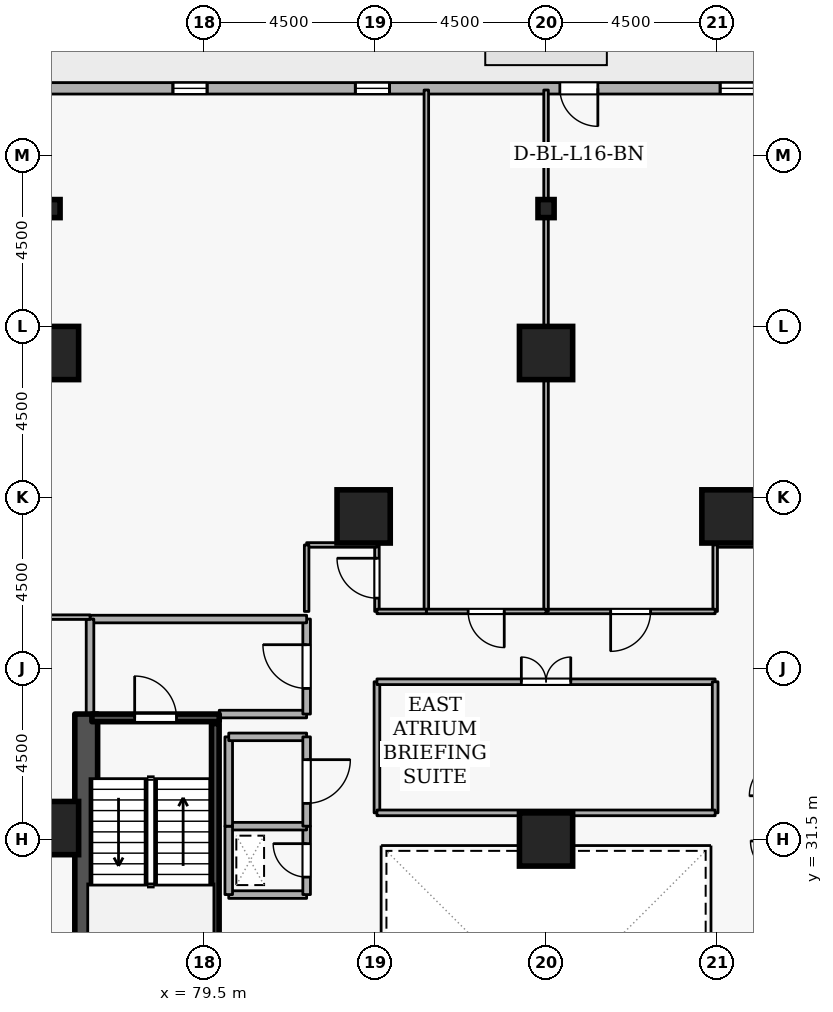
"""IFC4 building model, lengths in metres.
Left out: names, types, materials, properties, quantities, classifications, styles, units other than length and angle.
Written with IfcOpenShell. Run it as: python <this file> out.ifc"""

import sys

from ifc_helpers import new_model, si_unit, direction, frame, frame_2d, origin, origin_2d, place, context, subcontext, project, spatial, rectangle, i_section, extrude, element, fill, save


model = new_model("IFC4")
c1 = context("Model", 3, precision=1e-05, world=origin(), true_north=direction((0.0, 1.0)))
c2 = subcontext(c1, "Body", "Model", "MODEL_VIEW")
j1 = project(units=[si_unit("LENGTHUNIT", "METRE"), si_unit("PLANEANGLEUNIT", "RADIAN")], contexts=[c1])
p1 = place(None, origin())
s1 = spatial("IfcSite", under=j1, at=p1, CompositionType="ELEMENT")
p2 = place(p1, origin())
s2 = spatial("IfcBuilding", under=s1, at=p2, CompositionType="ELEMENT")
p3 = place(p2, frame((0.0, 0.0, 64.5)))
s3 = spatial("IfcBuildingStorey", under=s2, at=p3, CompositionType="ELEMENT", Elevation=64.5)
p4 = place(p3, frame((76.4, 19.2, 0.0), z_axis=(0.0, 0.0, 1.0), x_axis=(0.0, 1.0, 0.0)))
e1 = element("IfcWall", 1, at=p4, inside=s3, PredefinedType="SHEAR", context=c2, shape_type="SweptSolid", body=[
    extrude(rectangle(XDim=15.6, YDim=0.6, at=frame_2d((7.8, 0.0))), origin(), (0.0, 0.0, 1.0), 3.6),
])
for number, where, z_axis, x_axis in (
    (2, (88.5, 44.3, 0.0), (0.0, 0.0, 1.0), (1.0, 0.0, 0.0)),
    (3, (75.5, 44.3, 0.0), (0.0, 0.0, 1.0), (1.0, 0.0, 0.0)),
    (4, (93.3, 40.0, 0.0), (0.0, 0.0, 1.0), (1.0, 0.0, 0.0)),
    (5, (83.7, 40.0, 0.0), (0.0, 0.0, 1.0), (1.0, 0.0, 0.0)),
    (6, (75.5, 31.8, 0.0), (0.0, 0.0, 1.0), (1.0, 0.0, 0.0)),
    (7, (88.5, 31.5, 0.0), (0.0, 0.0, 1.0), (1.0, 0.0, 0.0)),
):
    element("IfcColumn", number, at=place(p3, frame(where, z_axis=z_axis, x_axis=x_axis)), inside=s3, PredefinedType="COLUMN", context=c2, shape_type="SweptSolid", body=[
        extrude(rectangle(XDim=1.4, YDim=1.4, at=origin_2d()), origin(), (0.0, 0.0, 1.0), 3.6),
    ])
for number, where, z_axis, x_axis in (
    (8, (88.5, 48.1, 0.0), (0.0, 0.0, 1.0), (1.0, 0.0, 0.0)),
    (9, (75.5, 48.1, 0.0), (0.0, 0.0, 1.0), (1.0, 0.0, 0.0)),
):
    element("IfcColumn", number, at=place(p3, frame(where, z_axis=z_axis, x_axis=x_axis)), inside=s3, PredefinedType="COLUMN", context=c2, shape_type="SweptSolid", body=[
        extrude(i_section(OverallWidth=0.424, OverallDepth=0.475, WebThickness=0.048, FlangeThickness=0.077, FilletRadius=0.015, at=origin_2d()), origin(), (0.0, 0.0, 1.0), 3.6),
    ])
p5 = place(p3, frame((110.181, 51.265, 0.0), z_axis=(0.0, 0.0, 1.0), x_axis=(-0.999999999457, -3.2959355e-05, 0.0)))
e10 = element("IfcWall", 10, at=p5, inside=s3, PredefinedType="STANDARD", context=c2, shape_type="SweptSolid", body=[
    extrude(rectangle(XDim=37.037, YDim=0.3, at=frame_2d((18.518, 0.0))), origin(), (0.0, 0.0, 1.0), 2.7),
])
p6 = place(p5, frame((20.318, 0.0, 0.0)))
e11 = element("IfcOpeningElement", 11, at=p6, cuts=e10, PredefinedType="OPENING", context=c2, shape_type="SweptSolid", body=[
    extrude(rectangle(XDim=1.0, YDim=2.08, at=frame_2d((0.5, 1.04))), frame((0.0, 0.16, 0.0), z_axis=(0.0, -1.0, 0.0), x_axis=(1.0, 0.0, 0.0)), (0.0, 0.0, 1.0), 0.32),
])
p7 = place(p5, frame((1.8, 0.0, 0.72)))
e12 = element("IfcOpeningElement", 12, at=p7, cuts=e10, PredefinedType="OPENING", context=c2, shape_type="SweptSolid", body=[
    extrude(rectangle(XDim=0.9, YDim=1.75, at=frame_2d((0.45, 0.875))), frame((0.0, 0.16, 0.0), z_axis=(0.0, -1.0, 0.0), x_axis=(1.0, 0.0, 0.0)), (0.0, 0.0, 1.0), 0.32),
])
p8 = place(p5, frame((6.6, 0.0, 0.72)))
e13 = element("IfcOpeningElement", 13, at=p8, cuts=e10, PredefinedType="OPENING", context=c2, shape_type="SweptSolid", body=[
    extrude(rectangle(XDim=0.9, YDim=1.75, at=frame_2d((0.45, 0.875))), frame((0.0, 0.16, 0.0), z_axis=(0.0, -1.0, 0.0), x_axis=(1.0, 0.0, 0.0)), (0.0, 0.0, 1.0), 0.32),
])
p9 = place(p5, frame((11.4, 0.0, 0.72)))
e14 = element("IfcOpeningElement", 14, at=p9, cuts=e10, PredefinedType="OPENING", context=c2, shape_type="SweptSolid", body=[
    extrude(rectangle(XDim=0.9, YDim=1.75, at=frame_2d((0.45, 0.875))), frame((0.0, 0.16, 0.0), z_axis=(0.0, -1.0, 0.0), x_axis=(1.0, 0.0, 0.0)), (0.0, 0.0, 1.0), 0.32),
])
p10 = place(p5, frame((16.2, 0.0, 0.72)))
e15 = element("IfcOpeningElement", 15, at=p10, cuts=e10, PredefinedType="OPENING", context=c2, shape_type="SweptSolid", body=[
    extrude(rectangle(XDim=0.9, YDim=1.75, at=frame_2d((0.45, 0.875))), frame((0.0, 0.16, 0.0), z_axis=(0.0, -1.0, 0.0), x_axis=(1.0, 0.0, 0.0)), (0.0, 0.0, 1.0), 0.32),
])
p11 = place(p5, frame((25.8, 0.0, 0.72)))
e16 = element("IfcOpeningElement", 16, at=p11, cuts=e10, PredefinedType="OPENING", context=c2, shape_type="SweptSolid", body=[
    extrude(rectangle(XDim=0.9, YDim=1.75, at=frame_2d((0.45, 0.875))), frame((0.0, 0.16, 0.0), z_axis=(0.0, -1.0, 0.0), x_axis=(1.0, 0.0, 0.0)), (0.0, 0.0, 1.0), 0.32),
])
p12 = place(p5, frame((30.6, 0.0, 0.72)))
e17 = element("IfcOpeningElement", 17, at=p12, cuts=e10, PredefinedType="OPENING", context=c2, shape_type="SweptSolid", body=[
    extrude(rectangle(XDim=0.9, YDim=1.75, at=frame_2d((0.45, 0.875))), frame((0.0, 0.16, 0.0), z_axis=(0.0, -1.0, 0.0), x_axis=(1.0, 0.0, 0.0)), (0.0, 0.0, 1.0), 0.32),
])
p13 = place(p3, frame((76.55, 34.7, 0.0), z_axis=(0.0, 0.0, 1.0), x_axis=(1.0, 0.0, 0.0)))
e18 = element("IfcWall", 18, at=p13, inside=s3, PredefinedType="SHEAR", context=c2, shape_type="SweptSolid", body=[
    extrude(rectangle(XDim=3.35, YDim=0.2, at=frame_2d((1.675, 0.0))), origin(), (0.0, 0.0, 1.0), 3.6),
])
p14 = place(p13, frame((1.125, 0.0, 0.0)))
e19 = element("IfcOpeningElement", 19, at=p14, cuts=e18, PredefinedType="OPENING", context=c2, shape_type="SweptSolid", body=[
    extrude(rectangle(XDim=1.1, YDim=2.1, at=frame_2d((0.55, 1.05))), frame((0.0, 0.11, 0.0), z_axis=(0.0, -1.0, 0.0), x_axis=(1.0, 0.0, 0.0)), (0.0, 0.0, 1.0), 0.22),
])
p15 = place(p3, frame((79.797, 27.45, 0.0), z_axis=(0.0, 0.0, 1.0), x_axis=(0.0, 1.0, 0.0)))
e20 = element("IfcWall", 20, at=p15, inside=s3, PredefinedType="SHEAR", context=c2, shape_type="SweptSolid", body=[
    extrude(rectangle(XDim=7.1, YDim=0.2, at=frame_2d((3.55, 0.0))), origin(), (0.0, 0.0, 1.0), 3.6),
])
p16 = place(p3, frame((79.9, 34.8, 0.0), z_axis=(0.0, 0.0, 1.0), x_axis=(1.0, 0.0, 0.0)))
e21 = element("IfcWall", 21, at=p16, inside=s3, PredefinedType="STANDARD", context=c2, shape_type="SweptSolid", body=[
    extrude(rectangle(XDim=2.3, YDim=0.2, at=frame_2d((1.15, 0.0))), origin(), (0.0, 0.0, 1.0), 2.545),
])
p17 = place(p3, frame((82.2, 34.8, 0.0), z_axis=(0.0, 0.0, 1.0), x_axis=(0.0, 1.0, 0.0)))
e22 = element("IfcWall", 22, at=p17, inside=s3, PredefinedType="STANDARD", context=c2, shape_type="SweptSolid", body=[
    extrude(rectangle(XDim=2.5, YDim=0.2, at=frame_2d((1.25, 0.0))), origin(), (0.0, 0.0, 1.0), 3.34),
])
p18 = place(p17, frame((0.675, 0.0, 0.0)))
e23 = element("IfcOpeningElement", 23, at=p18, cuts=e22, PredefinedType="OPENING", context=c2, shape_type="SweptSolid", body=[
    extrude(rectangle(XDim=1.15, YDim=2.1, at=frame_2d((0.575, 1.05))), frame((0.0, 0.11, 0.0), z_axis=(0.0, -1.0, 0.0), x_axis=(1.0, 0.0, 0.0)), (0.0, 0.0, 1.0), 0.22),
])
p19 = place(p3, frame((82.2, 37.3, 0.0), z_axis=(0.0, 0.0, 1.0), x_axis=(-1.0, 0.0, 0.0)))
e24 = element("IfcWall", 24, at=p19, inside=s3, PredefinedType="STANDARD", context=c2, shape_type="SweptSolid", body=[
    extrude(rectangle(XDim=5.7, YDim=0.2, at=frame_2d((2.85, 0.0))), origin(), (0.0, 0.0, 1.0), 3.34),
])
p20 = place(p3, frame((76.5, 37.3, 0.0), z_axis=(0.0, 0.0, 1.0), x_axis=(0.0, -1.0, 0.0)))
e25 = element("IfcWall", 25, at=p20, inside=s3, PredefinedType="STANDARD", context=c2, shape_type="SweptSolid", body=[
    extrude(rectangle(XDim=2.5, YDim=0.2, at=frame_2d((1.25, 0.0))), origin(), (0.0, 0.0, 1.0), 3.34),
])
p21 = place(p3, frame((80.15, 30.05, 0.0), z_axis=(0.0, 0.0, 1.0), x_axis=(1.0, 0.0, 0.0)))
e26 = element("IfcWall", 26, at=p21, inside=s3, PredefinedType="STANDARD", context=c2, shape_type="SweptSolid", body=[
    extrude(rectangle(XDim=2.05, YDim=0.2, at=frame_2d((1.025, 0.0))), origin(), (0.0, 0.0, 1.0), 3.34),
])
p22 = place(p3, frame((82.2, 30.05, 0.0), z_axis=(0.0, 0.0, 1.0), x_axis=(0.0, 1.0, 0.0)))
e27 = element("IfcWall", 27, at=p22, inside=s3, PredefinedType="STANDARD", context=c2, shape_type="SweptSolid", body=[
    extrude(rectangle(XDim=1.8, YDim=0.2, at=frame_2d((0.9, 0.0))), origin(), (0.0, 0.0, 1.0), 3.34),
])
p23 = place(p22, frame((0.46, 0.0, 0.0)))
e28 = element("IfcOpeningElement", 28, at=p23, cuts=e27, PredefinedType="OPENING", context=c2, shape_type="SweptSolid", body=[
    extrude(rectangle(XDim=0.88, YDim=2.04, at=frame_2d((0.44, 1.02))), frame((0.0, 0.11, 0.0), z_axis=(0.0, -1.0, 0.0), x_axis=(1.0, 0.0, 0.0)), (0.0, 0.0, 1.0), 0.22),
])
p24 = place(p3, frame((82.2, 31.85, 0.0), z_axis=(0.0, 0.0, 1.0), x_axis=(-1.0, 0.0, 0.0)))
e29 = element("IfcWall", 29, at=p24, inside=s3, PredefinedType="STANDARD", context=c2, shape_type="SweptSolid", body=[
    extrude(rectangle(XDim=2.05, YDim=0.2, at=frame_2d((1.025, 0.0))), origin(), (0.0, 0.0, 1.0), 3.34),
])
p25 = place(p3, frame((80.15, 31.85, 0.0), z_axis=(0.0, 0.0, 1.0), x_axis=(0.0, -1.0, 0.0)))
e30 = element("IfcWall", 30, at=p25, inside=s3, PredefinedType="STANDARD", context=c2, shape_type="SweptSolid", body=[
    extrude(rectangle(XDim=1.8, YDim=0.2, at=frame_2d((0.9, 0.0))), origin(), (0.0, 0.0, 1.0), 3.34),
])
p26 = place(p3, frame((80.15, 31.85, 0.0), z_axis=(0.0, 0.0, 1.0), x_axis=(0.0, 1.0, 0.0)))
e31 = element("IfcWall", 31, at=p26, inside=s3, PredefinedType="STANDARD", context=c2, shape_type="SweptSolid", body=[
    extrude(rectangle(XDim=2.35, YDim=0.2, at=frame_2d((1.175, 0.0))), origin(), (0.0, 0.0, 1.0), 3.34),
])
p27 = place(p3, frame((80.15, 34.2, 0.0), z_axis=(0.0, 0.0, 1.0), x_axis=(1.0, 0.0, 0.0)))
e32 = element("IfcWall", 32, at=p27, inside=s3, PredefinedType="STANDARD", context=c2, shape_type="SweptSolid", body=[
    extrude(rectangle(XDim=2.05, YDim=0.2, at=frame_2d((1.025, 0.0))), origin(), (0.0, 0.0, 1.0), 2.545),
])
p28 = place(p3, frame((82.2, 34.2, 0.0), z_axis=(0.0, 0.0, 1.0), x_axis=(0.0, -1.0, 0.0)))
e33 = element("IfcWall", 33, at=p28, inside=s3, PredefinedType="STANDARD", context=c2, shape_type="SweptSolid", body=[
    extrude(rectangle(XDim=2.35, YDim=0.2, at=frame_2d((1.175, 0.0))), origin(), (0.0, 0.0, 1.0), 3.34),
])
p29 = place(p28, frame((0.6, 0.0, 0.0)))
e34 = element("IfcOpeningElement", 34, at=p29, cuts=e33, PredefinedType="OPENING", context=c2, shape_type="SweptSolid", body=[
    extrude(rectangle(XDim=1.15, YDim=2.1, at=frame_2d((0.575, 1.05))), frame((0.0, 0.11, 0.0), z_axis=(0.0, -1.0, 0.0), x_axis=(1.0, 0.0, 0.0)), (0.0, 0.0, 1.0), 0.22),
])
p30 = place(p3, frame((94.8, 39.25, 0.0), z_axis=(0.0, 0.0, 1.0), x_axis=(-1.0, 0.0, 0.0)))
e35 = element("IfcWall", 35, at=p30, inside=s3, PredefinedType="PARTITIONING", context=c2, shape_type="SweptSolid", body=[
    extrude(rectangle(XDim=1.85, YDim=0.12, at=frame_2d((0.925, 0.0))), origin(), (0.0, 0.0, 1.0), 3.34),
])
p31 = place(p3, frame((92.95, 39.25, 0.0), z_axis=(0.0, 0.0, 1.0), x_axis=(0.0, -1.0, 0.0)))
e36 = element("IfcWall", 36, at=p31, inside=s3, PredefinedType="PARTITIONING", context=c2, shape_type="SweptSolid", body=[
    extrude(rectangle(XDim=1.75, YDim=0.12, at=frame_2d((0.875, 0.0))), origin(), (0.0, 0.0, 1.0), 3.34),
])
p32 = place(p3, frame((92.95, 37.5, 0.0), z_axis=(0.0, 0.0, 1.0), x_axis=(-1.0, 0.0, 0.0)))
e37 = element("IfcWall", 37, at=p32, inside=s3, PredefinedType="PARTITIONING", context=c2, shape_type="SweptSolid", body=[
    extrude(rectangle(XDim=4.45, YDim=0.12, at=frame_2d((2.225, 0.0))), origin(), (0.0, 0.0, 1.0), 3.34),
])
p33 = place(p32, frame((1.7, 0.0, 0.0)))
e38 = element("IfcOpeningElement", 38, at=p33, cuts=e37, PredefinedType="OPENING", context=c2, shape_type="SweptSolid", body=[
    extrude(rectangle(XDim=1.05, YDim=2.1, at=frame_2d((0.525, 1.05))), frame((0.0, 0.07, 0.0), z_axis=(0.0, -1.0, 0.0), x_axis=(1.0, 0.0, 0.0)), (0.0, 0.0, 1.0), 0.14),
])
p34 = place(p3, frame((88.5, 37.5, 0.0), z_axis=(0.0, 0.0, 1.0), x_axis=(0.0, 1.0, 0.0)))
e39 = element("IfcWall", 39, at=p34, inside=s3, PredefinedType="PARTITIONING", context=c2, shape_type="SweptSolid", body=[
    extrude(rectangle(XDim=13.72, YDim=0.12, at=frame_2d((6.86, 0.0))), origin(), (0.0, 0.0, 1.0), 2.878),
])
p35 = place(p3, frame((85.35, 37.5, 0.0), z_axis=(0.0, 0.0, 1.0), x_axis=(0.0, 1.0, 0.0)))
e40 = element("IfcWall", 40, at=p35, inside=s3, PredefinedType="PARTITIONING", context=c2, shape_type="SweptSolid", body=[
    extrude(rectangle(XDim=13.72, YDim=0.12, at=frame_2d((6.86, 0.0))), origin(), (0.0, 0.0, 1.0), 3.34),
])
p36 = place(p3, frame((88.5, 37.5, 0.0), z_axis=(0.0, 0.0, 1.0), x_axis=(-1.0, 0.0, 0.0)))
e41 = element("IfcWall", 41, at=p36, inside=s3, PredefinedType="PARTITIONING", context=c2, shape_type="SweptSolid", body=[
    extrude(rectangle(XDim=3.15, YDim=0.12, at=frame_2d((1.575, 0.0))), origin(), (0.0, 0.0, 1.0), 3.34),
])
p37 = place(p36, frame((1.1, 0.0, 0.0)))
e42 = element("IfcOpeningElement", 42, at=p37, cuts=e41, PredefinedType="OPENING", context=c2, shape_type="SweptSolid", body=[
    extrude(rectangle(XDim=0.95, YDim=2.1, at=frame_2d((0.475, 1.05))), frame((0.0, 0.07, 0.0), z_axis=(0.0, -1.0, 0.0), x_axis=(1.0, 0.0, 0.0)), (0.0, 0.0, 1.0), 0.14),
])
p38 = place(p3, frame((84.05, 37.5, 0.0), z_axis=(0.0, 0.0, 1.0), x_axis=(0.0, 1.0, 0.0)))
e43 = element("IfcWall", 43, at=p38, inside=s3, PredefinedType="PARTITIONING", context=c2, shape_type="SweptSolid", body=[
    extrude(rectangle(XDim=1.75, YDim=0.12, at=frame_2d((0.875, 0.0))), origin(), (0.0, 0.0, 1.0), 3.34),
])
p39 = place(p38, frame((0.35, 0.0, 0.0)))
e44 = element("IfcOpeningElement", 44, at=p39, cuts=e43, PredefinedType="OPENING", context=c2, shape_type="SweptSolid", body=[
    extrude(rectangle(XDim=1.05, YDim=2.1, at=frame_2d((0.525, 1.05))), frame((0.0, 0.07, 0.0), z_axis=(0.0, -1.0, 0.0), x_axis=(1.0, 0.0, 0.0)), (0.0, 0.0, 1.0), 0.14),
])
p40 = place(p3, frame((84.05, 39.25, 0.0), z_axis=(0.0, 0.0, 1.0), x_axis=(-1.0, 0.0, 0.0)))
e45 = element("IfcWall", 45, at=p40, inside=s3, PredefinedType="PARTITIONING", context=c2, shape_type="SweptSolid", body=[
    extrude(rectangle(XDim=1.85, YDim=0.12, at=frame_2d((0.925, 0.0))), origin(), (0.0, 0.0, 1.0), 3.34),
])
p41 = place(p3, frame((82.2, 39.25, 0.0), z_axis=(0.0, 0.0, 1.0), x_axis=(0.0, -1.0, 0.0)))
e46 = element("IfcWall", 46, at=p41, inside=s3, PredefinedType="PARTITIONING", context=c2, shape_type="SweptSolid", body=[
    extrude(rectangle(XDim=1.75, YDim=0.12, at=frame_2d((0.875, 0.0))), origin(), (0.0, 0.0, 1.0), 3.34),
])
p42 = place(p3, frame((76.5, 37.35, 0.0), z_axis=(0.0, 0.0, 1.0), x_axis=(-1.0, 0.0, 0.0)))
e47 = element("IfcWall", 47, at=p42, inside=s3, PredefinedType="PARTITIONING", context=c2, shape_type="SweptSolid", body=[
    extrude(rectangle(XDim=6.22, YDim=0.12, at=frame_2d((3.11, 0.0))), origin(), (0.0, 0.0, 1.0), 3.34),
])
p43 = place(p3, frame((85.35, 37.5, 0.0), z_axis=(0.0, 0.0, 1.0), x_axis=(-1.0, 0.0, 0.0)))
e48 = element("IfcWall", 48, at=p43, inside=s3, PredefinedType="PARTITIONING", context=c2, shape_type="SweptSolid", body=[
    extrude(rectangle(XDim=1.3, YDim=0.12, at=frame_2d((0.65, 0.0))), origin(), (0.0, 0.0, 1.0), 3.34),
])
p44 = place(p3, frame((84.05, 32.2, 0.0), z_axis=(0.0, 0.0, 1.0), x_axis=(0.0, 1.0, 0.0)))
e49 = element("IfcWall", 49, at=p44, inside=s3, PredefinedType="PARTITIONING", context=c2, shape_type="SweptSolid", body=[
    extrude(rectangle(XDim=3.45, YDim=0.15, at=frame_2d((1.725, 0.0))), origin(), (0.0, 0.0, 1.0), 3.34),
])
p45 = place(p3, frame((84.05, 35.65, 0.0), z_axis=(0.0, 0.0, 1.0), x_axis=(1.0, 0.0, 0.0)))
e50 = element("IfcWall", 50, at=p45, inside=s3, PredefinedType="PARTITIONING", context=c2, shape_type="SweptSolid", body=[
    extrude(rectangle(XDim=8.9, YDim=0.15, at=frame_2d((4.45, 0.0))), origin(), (0.0, 0.0, 1.0), 3.34),
])
p46 = place(p45, frame((3.8, 0.0, 0.0)))
e51 = element("IfcOpeningElement", 51, at=p46, cuts=e50, PredefinedType="OPENING", context=c2, shape_type="SweptSolid", body=[
    extrude(rectangle(XDim=1.3, YDim=2.12, at=frame_2d((0.65, 1.06))), frame((0.0, 0.085, 0.0), z_axis=(0.0, -1.0, 0.0), x_axis=(1.0, 0.0, 0.0)), (0.0, 0.0, 1.0), 0.17),
])
p47 = place(p3, frame((92.95, 35.65, 0.0), z_axis=(0.0, 0.0, 1.0), x_axis=(0.0, -1.0, 0.0)))
e52 = element("IfcWall", 52, at=p47, inside=s3, PredefinedType="PARTITIONING", context=c2, shape_type="SweptSolid", body=[
    extrude(rectangle(XDim=3.45, YDim=0.15, at=frame_2d((1.725, 0.0))), origin(), (0.0, 0.0, 1.0), 3.34),
])
p48 = place(p3, frame((92.95, 32.2, 0.0), z_axis=(0.0, 0.0, 1.0), x_axis=(-1.0, 0.0, 0.0)))
e53 = element("IfcWall", 53, at=p48, inside=s3, PredefinedType="PARTITIONING", context=c2, shape_type="SweptSolid", body=[
    extrude(rectangle(XDim=8.9, YDim=0.15, at=frame_2d((4.45, 0.0))), origin(), (0.0, 0.0, 1.0), 3.34),
])
p49 = place(p6, origin())
e54 = element("IfcDoor", 54, at=p49, inside=s3, OperationType="SINGLE_SWING_LEFT", PredefinedType="DOOR", context=c2, shape_type="SweptSolid", body=[
    extrude(rectangle(XDim=1.0, YDim=2.08, at=frame_2d((0.5, 1.04))), frame((0.0, 0.025, 0.0), z_axis=(0.0, -1.0, 0.0), x_axis=(1.0, 0.0, 0.0)), (0.0, 0.0, 1.0), 0.05),
])
fill(e11, e54)
p50 = place(p10, origin())
e55 = element("IfcWindow", 55, at=p50, inside=s3, PartitioningType="SINGLE_PANEL", PredefinedType="WINDOW", context=c2, shape_type="SweptSolid", body=[
    extrude(rectangle(XDim=0.9, YDim=1.75, at=frame_2d((0.45, 0.875))), frame((0.0, 0.03, 0.0), z_axis=(0.0, -1.0, 0.0), x_axis=(1.0, 0.0, 0.0)), (0.0, 0.0, 1.0), 0.06),
])
fill(e15, e55)
p51 = place(p11, origin())
e56 = element("IfcWindow", 56, at=p51, inside=s3, PartitioningType="SINGLE_PANEL", PredefinedType="WINDOW", context=c2, shape_type="SweptSolid", body=[
    extrude(rectangle(XDim=0.9, YDim=1.75, at=frame_2d((0.45, 0.875))), frame((0.0, 0.03, 0.0), z_axis=(0.0, -1.0, 0.0), x_axis=(1.0, 0.0, 0.0)), (0.0, 0.0, 1.0), 0.06),
])
fill(e16, e56)
p52 = place(p12, origin())
e57 = element("IfcWindow", 57, at=p52, inside=s3, PartitioningType="SINGLE_PANEL", PredefinedType="WINDOW", context=c2, shape_type="SweptSolid", body=[
    extrude(rectangle(XDim=0.9, YDim=1.75, at=frame_2d((0.45, 0.875))), frame((0.0, 0.03, 0.0), z_axis=(0.0, -1.0, 0.0), x_axis=(1.0, 0.0, 0.0)), (0.0, 0.0, 1.0), 0.06),
])
fill(e17, e57)
p53 = place(p14, origin())
e58 = element("IfcDoor", 58, at=p53, inside=s3, OperationType="SINGLE_SWING_LEFT", PredefinedType="DOOR", context=c2, shape_type="SweptSolid", body=[
    extrude(rectangle(XDim=1.1, YDim=2.1, at=frame_2d((0.55, 1.05))), frame((0.0, 0.025, 0.0), z_axis=(0.0, -1.0, 0.0), x_axis=(1.0, 0.0, 0.0)), (0.0, 0.0, 1.0), 0.05),
])
fill(e19, e58)
p54 = place(p18, origin())
e59 = element("IfcDoor", 59, at=p54, inside=s3, OperationType="SINGLE_SWING_RIGHT", PredefinedType="DOOR", context=c2, shape_type="SweptSolid", body=[
    extrude(rectangle(XDim=1.15, YDim=2.1, at=frame_2d((0.575, 1.05))), frame((0.0, 0.025, 0.0), z_axis=(0.0, -1.0, 0.0), x_axis=(1.0, 0.0, 0.0)), (0.0, 0.0, 1.0), 0.05),
])
fill(e23, e59)
p55 = place(p23, origin())
e60 = element("IfcDoor", 60, at=p55, inside=s3, OperationType="SINGLE_SWING_RIGHT", PredefinedType="DOOR", context=c2, shape_type="SweptSolid", body=[
    extrude(rectangle(XDim=0.88, YDim=2.04, at=frame_2d((0.44, 1.02))), frame((0.0, 0.025, 0.0), z_axis=(0.0, -1.0, 0.0), x_axis=(1.0, 0.0, 0.0)), (0.0, 0.0, 1.0), 0.05),
])
fill(e28, e60)
p56 = place(p29, origin())
e61 = element("IfcDoor", 61, at=p56, inside=s3, OperationType="SINGLE_SWING_LEFT", PredefinedType="DOOR", context=c2, shape_type="SweptSolid", body=[
    extrude(rectangle(XDim=1.15, YDim=2.1, at=frame_2d((0.575, 1.05))), frame((0.0, 0.025, 0.0), z_axis=(0.0, -1.0, 0.0), x_axis=(1.0, 0.0, 0.0)), (0.0, 0.0, 1.0), 0.05),
])
fill(e34, e61)
p57 = place(p33, origin())
e62 = element("IfcDoor", 62, at=p57, inside=s3, OperationType="SINGLE_SWING_RIGHT", PredefinedType="DOOR", context=c2, shape_type="SweptSolid", body=[
    extrude(rectangle(XDim=1.05, YDim=2.1, at=frame_2d((0.525, 1.05))), frame((0.0, 0.025, 0.0), z_axis=(0.0, -1.0, 0.0), x_axis=(1.0, 0.0, 0.0)), (0.0, 0.0, 1.0), 0.05),
])
fill(e38, e62)
p58 = place(p37, origin())
e63 = element("IfcDoor", 63, at=p58, inside=s3, OperationType="SINGLE_SWING_LEFT", PredefinedType="DOOR", context=c2, shape_type="SweptSolid", body=[
    extrude(rectangle(XDim=0.95, YDim=2.1, at=frame_2d((0.475, 1.05))), frame((0.0, 0.025, 0.0), z_axis=(0.0, -1.0, 0.0), x_axis=(1.0, 0.0, 0.0)), (0.0, 0.0, 1.0), 0.05),
])
fill(e42, e63)
p59 = place(p39, origin())
e64 = element("IfcDoor", 64, at=p59, inside=s3, OperationType="SINGLE_SWING_RIGHT", PredefinedType="DOOR", context=c2, shape_type="SweptSolid", body=[
    extrude(rectangle(XDim=1.05, YDim=2.1, at=frame_2d((0.525, 1.05))), frame((0.0, 0.025, 0.0), z_axis=(0.0, -1.0, 0.0), x_axis=(1.0, 0.0, 0.0)), (0.0, 0.0, 1.0), 0.05),
])
fill(e44, e64)
p60 = place(p46, origin())
e65 = element("IfcDoor", 65, at=p60, inside=s3, OperationType="DOUBLE_DOOR_SINGLE_SWING", PredefinedType="DOOR", context=c2, shape_type="SweptSolid", body=[
    extrude(rectangle(XDim=1.3, YDim=2.12, at=frame_2d((0.65, 1.06))), frame((0.0, 0.025, 0.0), z_axis=(0.0, -1.0, 0.0), x_axis=(1.0, 0.0, 0.0)), (0.0, 0.0, 1.0), 0.05),
])
fill(e51, e65)
save(model, sys.argv[1])
